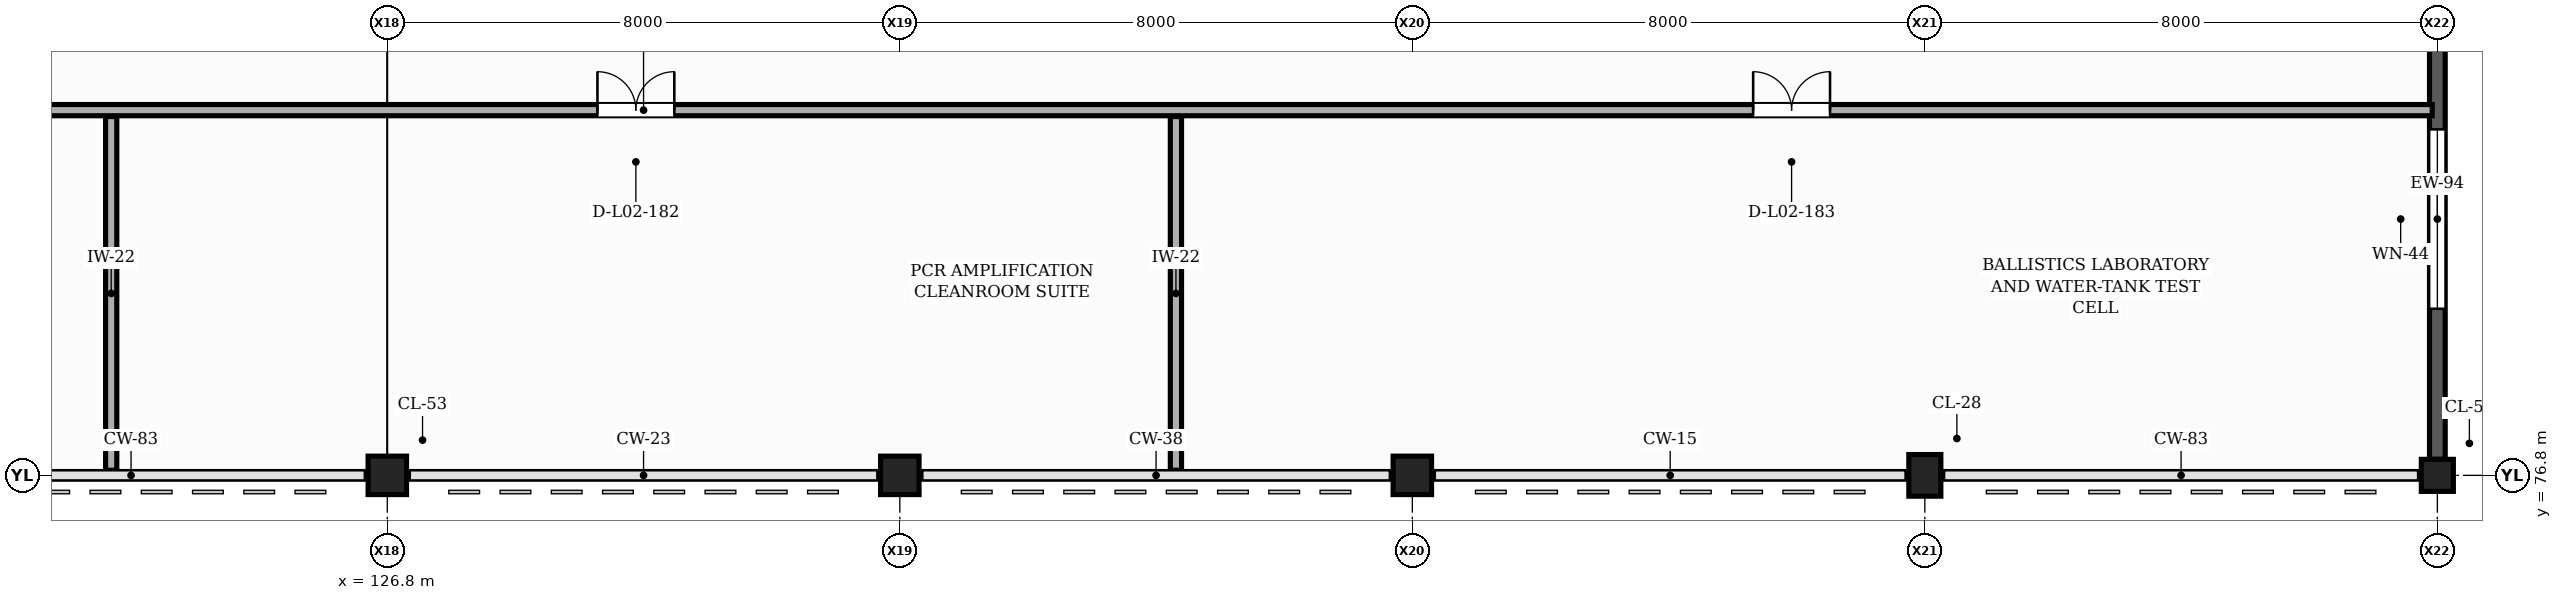
"""IFC4 building model, lengths in metres.
Left out: names, types, materials, properties, quantities, classifications, styles, units other than length and angle.
Written with IfcOpenShell. Run it as: python <this file> out.ifc"""

import sys

from ifc_helpers import new_model, si_unit, direction, frame, frame_2d, origin, origin_2d, place, context, subcontext, project, spatial, rectangle, extrude, element, fill, save


model = new_model("IFC4")
c1 = context("Model", 3, precision=1e-05, world=origin(), true_north=direction((0.0, 1.0)))
c2 = subcontext(c1, "Body", "Model", "MODEL_VIEW")
j1 = project(units=[si_unit("LENGTHUNIT", "METRE"), si_unit("PLANEANGLEUNIT", "RADIAN")], contexts=[c1])
p1 = place(None, origin())
s1 = spatial("IfcSite", under=j1, at=p1, CompositionType="ELEMENT")
p2 = place(p1, origin())
s2 = spatial("IfcBuilding", under=s1, at=p2, CompositionType="ELEMENT")
p3 = place(p2, frame((0.0, 0.0, 9.0)))
s3 = spatial("IfcBuildingStorey", under=s2, at=p3, CompositionType="ELEMENT", Elevation=9.0)
for number, where, z_axis, x_axis in (
    (1, (126.8, 76.8, 0.0), (0.0, 0.0, 1.0), (1.0, 0.0, 0.0)),
    (2, (134.8, 76.8, 0.0), (0.0, 0.0, 1.0), (1.0, 0.0, 0.0)),
    (3, (142.8, 76.8, 0.0), (0.0, 0.0, 1.0), (1.0, 0.0, 0.0)),
):
    element("IfcColumn", number, at=place(p3, frame(where, z_axis=z_axis, x_axis=x_axis)), inside=s3, PredefinedType="COLUMN", context=c2, shape_type="SweptSolid", body=[
        extrude(rectangle(XDim=0.6, YDim=0.6, at=origin_2d()), origin(), (0.0, 0.0, 1.0), 4.5),
    ])
p4 = place(p3, frame((150.8, 76.8, 0.0), z_axis=(0.0, 0.0, 1.0), x_axis=(1.0, 0.0, 0.0)))
e4 = element("IfcColumn", 4, at=p4, inside=s3, PredefinedType="COLUMN", context=c2, shape_type="SweptSolid", body=[
    extrude(rectangle(XDim=0.5, YDim=0.65, at=origin_2d()), origin(), (0.0, 0.0, 1.0), 4.5),
])
p5 = place(p3, frame((158.8, 76.8, 0.0), z_axis=(0.0, 0.0, 1.0), x_axis=(1.0, 0.0, 0.0)))
e5 = element("IfcColumn", 5, at=p5, inside=s3, PredefinedType="COLUMN", context=c2, shape_type="SweptSolid", body=[
    extrude(rectangle(XDim=0.5, YDim=0.5, at=origin_2d()), origin(), (0.0, 0.0, 1.0), 4.5),
])
p6 = place(p3, frame((158.8, 77.05, 0.0), z_axis=(0.0, 0.0, 1.0), x_axis=(0.0, 1.0, 0.0)))
e6 = element("IfcWall", 6, at=p6, inside=s3, PredefinedType="SOLIDWALL", context=c2, shape_type="SweptSolid", body=[
    extrude(rectangle(XDim=7.5, YDim=0.245, at=frame_2d((3.75, 0.0))), origin(), (0.0, 0.0, 1.0), 3.57),
])
p7 = place(p6, frame((2.35, 0.0, 0.9)))
e7 = element("IfcOpeningElement", 7, at=p7, cuts=e6, PredefinedType="OPENING", context=c2, shape_type="SweptSolid", body=[
    extrude(rectangle(XDim=2.8, YDim=1.8, at=frame_2d((1.4, 0.9))), frame((0.0, 0.133, 0.0), z_axis=(0.0, -1.0, 0.0), x_axis=(1.0, 0.0, 0.0)), (0.0, 0.0, 1.0), 0.265),
])
for number, where, z_axis, x_axis in (
    (8, (122.49, 76.88, 0.0), (0.0, 0.0, 1.0), (0.0, 1.0, 0.0)),
    (9, (139.11, 76.88, 0.0), (0.0, 0.0, 1.0), (0.0, 1.0, 0.0)),
):
    element("IfcWall", number, at=place(p3, frame(where, z_axis=z_axis, x_axis=x_axis)), inside=s3, PredefinedType="PARTITIONING", context=c2, shape_type="SweptSolid", body=[
        extrude(rectangle(XDim=5.52, YDim=0.175, at=frame_2d((2.76, 0.0))), origin(), (0.0, 0.0, 1.0), 3.555),
    ])
p8 = place(p3, frame((102.88, 82.5, 0.0), z_axis=(0.0, 0.0, 1.0), x_axis=(1.0, 0.0, 0.0)))
e10 = element("IfcWall", 10, at=p8, inside=s3, PredefinedType="PARTITIONING", context=c2, shape_type="SweptSolid", body=[
    extrude(rectangle(XDim=55.84, YDim=0.175, at=frame_2d((27.92, 0.0))), origin(), (0.0, 0.0, 1.0), 3.555),
])
p9 = place(p8, frame((9.15, 0.0, 0.0)))
e11 = element("IfcOpeningElement", 11, at=p9, cuts=e10, PredefinedType="OPENING", context=c2, shape_type="SweptSolid", body=[
    extrude(rectangle(XDim=1.2, YDim=2.2, at=frame_2d((0.6, 1.1))), frame((0.0, 0.098, 0.0), z_axis=(0.0, -1.0, 0.0), x_axis=(1.0, 0.0, 0.0)), (0.0, 0.0, 1.0), 0.195),
])
p10 = place(p8, frame((27.2, 0.0, 0.0)))
e12 = element("IfcOpeningElement", 12, at=p10, cuts=e10, PredefinedType="OPENING", context=c2, shape_type="SweptSolid", body=[
    extrude(rectangle(XDim=1.2, YDim=2.2, at=frame_2d((0.6, 1.1))), frame((0.0, 0.098, 0.0), z_axis=(0.0, -1.0, 0.0), x_axis=(1.0, 0.0, 0.0)), (0.0, 0.0, 1.0), 0.195),
])
p11 = place(p8, frame((45.24, 0.0, 0.0)))
e13 = element("IfcOpeningElement", 13, at=p11, cuts=e10, PredefinedType="OPENING", context=c2, shape_type="SweptSolid", body=[
    extrude(rectangle(XDim=1.2, YDim=2.2, at=frame_2d((0.6, 1.1))), frame((0.0, 0.098, 0.0), z_axis=(0.0, -1.0, 0.0), x_axis=(1.0, 0.0, 0.0)), (0.0, 0.0, 1.0), 0.195),
])
p12 = place(p7, origin())
e14 = element("IfcWindow", 14, at=p12, inside=s3, PartitioningType="SINGLE_PANEL", PredefinedType="WINDOW", context=c2, shape_type="SweptSolid", body=[
    extrude(rectangle(XDim=2.8, YDim=1.8, at=frame_2d((1.4, 0.9))), frame((0.0, 0.03, 0.0), z_axis=(0.0, -1.0, 0.0), x_axis=(1.0, 0.0, 0.0)), (0.0, 0.0, 1.0), 0.06),
])
fill(e7, e14)
p13 = place(p10, origin())
e15 = element("IfcDoor", 15, at=p13, inside=s3, OperationType="DOUBLE_DOOR_SINGLE_SWING", PredefinedType="DOOR", context=c2, shape_type="SweptSolid", body=[
    extrude(rectangle(XDim=1.2, YDim=2.2, at=frame_2d((0.6, 1.1))), frame((0.0, 0.025, 0.0), z_axis=(0.0, -1.0, 0.0), x_axis=(1.0, 0.0, 0.0)), (0.0, 0.0, 1.0), 0.05),
])
fill(e12, e15)
p14 = place(p11, origin())
e16 = element("IfcDoor", 16, at=p14, inside=s3, OperationType="DOUBLE_DOOR_SINGLE_SWING", PredefinedType="DOOR", context=c2, shape_type="SweptSolid", body=[
    extrude(rectangle(XDim=1.2, YDim=2.2, at=frame_2d((0.6, 1.1))), frame((0.0, 0.025, 0.0), z_axis=(0.0, -1.0, 0.0), x_axis=(1.0, 0.0, 0.0)), (0.0, 0.0, 1.0), 0.05),
])
fill(e13, e16)
save(model, sys.argv[1])
